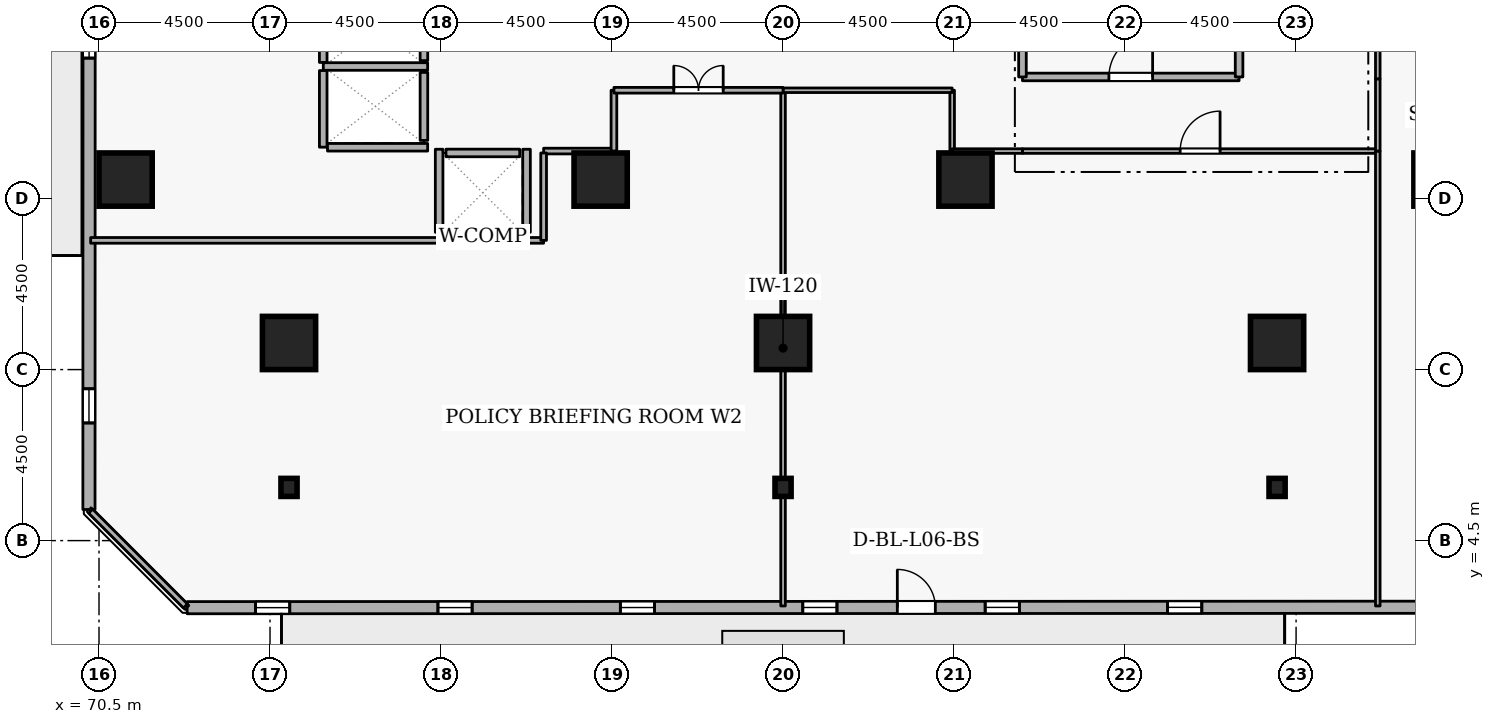
"""IFC4 building model, lengths in metres.
Left out: names, types, materials, properties, quantities, classifications, styles, units other than length and angle.
Written with IfcOpenShell. Run it as: python <this file> out.ifc"""

import sys

from ifc_helpers import new_model, si_unit, direction, frame, frame_2d, origin, origin_2d, place, context, subcontext, project, spatial, rectangle, i_section, extrude, element, fill, save


model = new_model("IFC4")
c1 = context("Model", 3, precision=1e-05, world=origin(), true_north=direction((0.0, 1.0)))
c2 = subcontext(c1, "Body", "Model", "MODEL_VIEW")
j1 = project(units=[si_unit("LENGTHUNIT", "METRE"), si_unit("PLANEANGLEUNIT", "RADIAN")], contexts=[c1])
p1 = place(None, origin())
s1 = spatial("IfcSite", under=j1, at=p1, CompositionType="ELEMENT")
p2 = place(p1, origin())
s2 = spatial("IfcBuilding", under=s1, at=p2, CompositionType="ELEMENT")
p3 = place(p2, frame((0.0, 0.0, 27.9)))
s3 = spatial("IfcBuildingStorey", under=s2, at=p3, CompositionType="ELEMENT", Elevation=27.9)
for number, where, z_axis, x_axis in (
    (1, (105.8, 14.0, 0.0), (0.0, 0.0, 1.0), (1.0, 0.0, 0.0)),
    (2, (71.2, 14.0, 0.0), (0.0, 0.0, 1.0), (1.0, 0.0, 0.0)),
    (3, (101.5, 9.7, 0.0), (0.0, 0.0, 1.0), (1.0, 0.0, 0.0)),
    (4, (88.5, 9.7, 0.0), (0.0, 0.0, 1.0), (1.0, 0.0, 0.0)),
    (5, (75.5, 9.7, 0.0), (0.0, 0.0, 1.0), (1.0, 0.0, 0.0)),
    (6, (93.3, 14.0, 0.0), (0.0, 0.0, 1.0), (1.0, 0.0, 0.0)),
    (7, (83.7, 14.0, 0.0), (0.0, 0.0, 1.0), (1.0, 0.0, 0.0)),
):
    element("IfcColumn", number, at=place(p3, frame(where, z_axis=z_axis, x_axis=x_axis)), inside=s3, PredefinedType="COLUMN", context=c2, shape_type="SweptSolid", body=[
        extrude(rectangle(XDim=1.4, YDim=1.4, at=origin_2d()), origin(), (0.0, 0.0, 1.0), 3.6),
    ])
for number, where, z_axis, x_axis in (
    (8, (101.5, 5.9, 0.0), (0.0, 0.0, 1.0), (1.0, 0.0, 0.0)),
    (9, (88.5, 5.9, 0.0), (0.0, 0.0, 1.0), (1.0, 0.0, 0.0)),
    (10, (75.5, 5.9, 0.0), (0.0, 0.0, 1.0), (1.0, 0.0, 0.0)),
):
    element("IfcColumn", number, at=place(p3, frame(where, z_axis=z_axis, x_axis=x_axis)), inside=s3, PredefinedType="COLUMN", context=c2, shape_type="SweptSolid", body=[
        extrude(i_section(OverallWidth=0.424, OverallDepth=0.475, WebThickness=0.048, FlangeThickness=0.077, FilletRadius=0.015, at=origin_2d()), origin(), (0.0, 0.0, 1.0), 3.6),
    ])
p4 = place(p3, frame((72.819, 2.735, 0.0), z_axis=(0.0, 0.0, 1.0), x_axis=(0.999999942296, 0.000339718087, 0.0)))
e11 = element("IfcWall", 11, at=p4, inside=s3, PredefinedType="STANDARD", context=c2, shape_type="SweptSolid", body=[
    extrude(rectangle(XDim=33.777, YDim=0.32, at=frame_2d((16.888, 0.0))), origin(), (0.0, 0.0, 1.0), 2.7),
])
p5 = place(p4, frame((18.688, 0.0, 0.0)))
e12 = element("IfcOpeningElement", 12, at=p5, cuts=e11, PredefinedType="OPENING", context=c2, shape_type="SweptSolid", body=[
    extrude(rectangle(XDim=1.0, YDim=2.08, at=frame_2d((0.5, 1.04))), frame((0.0, 0.17, 0.0), z_axis=(0.0, -1.0, 0.0), x_axis=(1.0, 0.0, 0.0)), (0.0, 0.0, 1.0), 0.34),
])
p6 = place(p4, frame((1.8, 0.0, 0.72)))
e13 = element("IfcOpeningElement", 13, at=p6, cuts=e11, PredefinedType="OPENING", context=c2, shape_type="SweptSolid", body=[
    extrude(rectangle(XDim=0.9, YDim=1.75, at=frame_2d((0.45, 0.875))), frame((0.0, 0.17, 0.0), z_axis=(0.0, -1.0, 0.0), x_axis=(1.0, 0.0, 0.0)), (0.0, 0.0, 1.0), 0.34),
])
p7 = place(p4, frame((6.6, 0.0, 0.72)))
e14 = element("IfcOpeningElement", 14, at=p7, cuts=e11, PredefinedType="OPENING", context=c2, shape_type="SweptSolid", body=[
    extrude(rectangle(XDim=0.9, YDim=1.75, at=frame_2d((0.45, 0.875))), frame((0.0, 0.17, 0.0), z_axis=(0.0, -1.0, 0.0), x_axis=(1.0, 0.0, 0.0)), (0.0, 0.0, 1.0), 0.34),
])
p8 = place(p4, frame((11.4, 0.0, 0.72)))
e15 = element("IfcOpeningElement", 15, at=p8, cuts=e11, PredefinedType="OPENING", context=c2, shape_type="SweptSolid", body=[
    extrude(rectangle(XDim=0.9, YDim=1.75, at=frame_2d((0.45, 0.875))), frame((0.0, 0.17, 0.0), z_axis=(0.0, -1.0, 0.0), x_axis=(1.0, 0.0, 0.0)), (0.0, 0.0, 1.0), 0.34),
])
p9 = place(p4, frame((16.2, 0.0, 0.72)))
e16 = element("IfcOpeningElement", 16, at=p9, cuts=e11, PredefinedType="OPENING", context=c2, shape_type="SweptSolid", body=[
    extrude(rectangle(XDim=0.9, YDim=1.75, at=frame_2d((0.45, 0.875))), frame((0.0, 0.17, 0.0), z_axis=(0.0, -1.0, 0.0), x_axis=(1.0, 0.0, 0.0)), (0.0, 0.0, 1.0), 0.34),
])
p10 = place(p4, frame((21.0, 0.0, 0.72)))
e17 = element("IfcOpeningElement", 17, at=p10, cuts=e11, PredefinedType="OPENING", context=c2, shape_type="SweptSolid", body=[
    extrude(rectangle(XDim=0.9, YDim=1.75, at=frame_2d((0.45, 0.875))), frame((0.0, 0.17, 0.0), z_axis=(0.0, -1.0, 0.0), x_axis=(1.0, 0.0, 0.0)), (0.0, 0.0, 1.0), 0.34),
])
p11 = place(p4, frame((25.8, 0.0, 0.72)))
e18 = element("IfcOpeningElement", 18, at=p11, cuts=e11, PredefinedType="OPENING", context=c2, shape_type="SweptSolid", body=[
    extrude(rectangle(XDim=0.9, YDim=1.75, at=frame_2d((0.45, 0.875))), frame((0.0, 0.17, 0.0), z_axis=(0.0, -1.0, 0.0), x_axis=(1.0, 0.0, 0.0)), (0.0, 0.0, 1.0), 0.34),
])
p12 = place(p3, frame((70.247, 39.096, 0.0), z_axis=(0.0, 0.0, 1.0), x_axis=(-0.000339718087, -0.999999942296, 0.0)))
e19 = element("IfcWall", 19, at=p12, inside=s3, PredefinedType="STANDARD", context=c2, shape_type="SweptSolid", body=[
    extrude(rectangle(XDim=33.777, YDim=0.32, at=frame_2d((16.888, 0.0))), origin(), (0.0, 0.0, 1.0), 2.7),
])
p13 = place(p12, frame((6.6, 0.0, 0.72)))
e20 = element("IfcOpeningElement", 20, at=p13, cuts=e19, PredefinedType="OPENING", context=c2, shape_type="SweptSolid", body=[
    extrude(rectangle(XDim=0.9, YDim=1.75, at=frame_2d((0.45, 0.875))), frame((0.0, 0.17, 0.0), z_axis=(0.0, -1.0, 0.0), x_axis=(1.0, 0.0, 0.0)), (0.0, 0.0, 1.0), 0.34),
])
p14 = place(p12, frame((16.2, 0.0, 0.72)))
e21 = element("IfcOpeningElement", 21, at=p14, cuts=e19, PredefinedType="OPENING", context=c2, shape_type="SweptSolid", body=[
    extrude(rectangle(XDim=0.9, YDim=1.75, at=frame_2d((0.45, 0.875))), frame((0.0, 0.17, 0.0), z_axis=(0.0, -1.0, 0.0), x_axis=(1.0, 0.0, 0.0)), (0.0, 0.0, 1.0), 0.34),
])
p15 = place(p12, frame((21.0, 0.0, 0.72)))
e22 = element("IfcOpeningElement", 22, at=p15, cuts=e19, PredefinedType="OPENING", context=c2, shape_type="SweptSolid", body=[
    extrude(rectangle(XDim=0.9, YDim=1.75, at=frame_2d((0.45, 0.875))), frame((0.0, 0.17, 0.0), z_axis=(0.0, -1.0, 0.0), x_axis=(1.0, 0.0, 0.0)), (0.0, 0.0, 1.0), 0.34),
])
p16 = place(p12, frame((30.6, 0.0, 0.72)))
e23 = element("IfcOpeningElement", 23, at=p16, cuts=e19, PredefinedType="OPENING", context=c2, shape_type="SweptSolid", body=[
    extrude(rectangle(XDim=0.9, YDim=1.75, at=frame_2d((0.45, 0.875))), frame((0.0, 0.17, 0.0), z_axis=(0.0, -1.0, 0.0), x_axis=(1.0, 0.0, 0.0)), (0.0, 0.0, 1.0), 0.34),
])
p17 = place(p3, frame((79.05, 17.13, 0.0), z_axis=(0.0, 0.0, 1.0), x_axis=(0.0, 1.0, 0.0)))
e24 = element("IfcWall", 24, at=p17, inside=s3, PredefinedType="STANDARD", context=c2, shape_type="SweptSolid", body=[
    extrude(rectangle(XDim=1.74, YDim=0.2, at=frame_2d((0.87, 0.0))), origin(), (0.0, 0.0, 1.0), 3.34),
])
p18 = place(p3, frame((79.05, 15.03, 0.0), z_axis=(0.0, 0.0, 1.0), x_axis=(0.0, 1.0, 0.0)))
e25 = element("IfcWall", 25, at=p18, inside=s3, PredefinedType="STANDARD", context=c2, shape_type="SweptSolid", body=[
    extrude(rectangle(XDim=1.79, YDim=0.2, at=frame_2d((0.895, 0.0))), origin(), (0.0, 0.0, 1.0), 3.34),
])
p19 = place(p3, frame((79.63, 14.7, 0.0), z_axis=(0.0, 0.0, 1.0), x_axis=(1.0, 0.0, 0.0)))
e26 = element("IfcWall", 26, at=p19, inside=s3, PredefinedType="STANDARD", context=c2, shape_type="SweptSolid", body=[
    extrude(rectangle(XDim=1.94, YDim=0.2, at=frame_2d((0.97, 0.0))), origin(), (0.0, 0.0, 1.0), 3.34),
])
p20 = place(p3, frame((76.402, 16.975, 0.0), z_axis=(0.0, 0.0, 1.0), x_axis=(1.0, 0.0, 0.0)))
e27 = element("IfcWall", 27, at=p20, inside=s3, PredefinedType="STANDARD", context=c2, shape_type="SweptSolid", body=[
    extrude(rectangle(XDim=2.746, YDim=0.2, at=frame_2d((1.373, 0.0))), origin(), (0.0, 0.0, 1.0), 3.34),
])
p21 = place(p3, frame((76.4, 14.852, 0.0), z_axis=(0.0, 0.0, 1.0), x_axis=(0.0, 1.0, 0.0)))
e28 = element("IfcWall", 28, at=p21, inside=s3, PredefinedType="STANDARD", context=c2, shape_type="SweptSolid", body=[
    extrude(rectangle(XDim=2.016, YDim=0.2, at=frame_2d((1.008, 0.0))), origin(), (0.0, 0.0, 1.0), 3.34),
])
p22 = place(p3, frame((76.4, 17.082, 0.0), z_axis=(0.0, 0.0, 1.0), x_axis=(0.0, 1.0, 0.0)))
e29 = element("IfcWall", 29, at=p22, inside=s3, PredefinedType="STANDARD", context=c2, shape_type="SweptSolid", body=[
    extrude(rectangle(XDim=1.856, YDim=0.2, at=frame_2d((0.928, 0.0))), origin(), (0.0, 0.0, 1.0), 3.34),
])
p23 = place(p3, frame((76.512, 14.85, 0.0), z_axis=(0.0, 0.0, 1.0), x_axis=(1.0, 0.0, 0.0)))
e30 = element("IfcWall", 30, at=p23, inside=s3, PredefinedType="STANDARD", context=c2, shape_type="SweptSolid", body=[
    extrude(rectangle(XDim=2.636, YDim=0.2, at=frame_2d((1.318, 0.0))), origin(), (0.0, 0.0, 1.0), 3.34),
])
p24 = place(p3, frame((79.452, 12.5, 0.0), z_axis=(0.0, 0.0, 1.0), x_axis=(1.0, 0.0, 0.0)))
e31 = element("IfcWall", 31, at=p24, inside=s3, PredefinedType="STANDARD", context=c2, shape_type="SweptSolid", body=[
    extrude(rectangle(XDim=2.296, YDim=0.2, at=frame_2d((1.148, 0.0))), origin(), (0.0, 0.0, 1.0), 3.34),
])
for number, where, z_axis, x_axis in (
    (32, (81.75, 12.612, 0.0), (0.0, 0.0, 1.0), (0.0, 1.0, 0.0)),
    (33, (79.45, 12.612, 0.0), (0.0, 0.0, 1.0), (0.0, 1.0, 0.0)),
):
    element("IfcWall", number, at=place(p3, frame(where, z_axis=z_axis, x_axis=x_axis)), inside=s3, PredefinedType="STANDARD", context=c2, shape_type="SweptSolid", body=[
        extrude(rectangle(XDim=2.186, YDim=0.2, at=frame_2d((1.093, 0.0))), origin(), (0.0, 0.0, 1.0), 3.34),
    ])
p25 = place(p3, frame((94.8, 16.7, 0.0), z_axis=(0.0, 0.0, 1.0), x_axis=(1.0, 0.0, 0.0)))
e34 = element("IfcWall", 34, at=p25, inside=s3, PredefinedType="STANDARD", context=c2, shape_type="SweptSolid", body=[
    extrude(rectangle(XDim=5.7, YDim=0.2, at=frame_2d((2.85, 0.0))), origin(), (0.0, 0.0, 1.0), 3.34),
])
p26 = place(p25, frame((2.275, 0.0, 0.0)))
e35 = element("IfcOpeningElement", 35, at=p26, cuts=e34, PredefinedType="OPENING", context=c2, shape_type="SweptSolid", body=[
    extrude(rectangle(XDim=1.15, YDim=2.1, at=frame_2d((0.575, 1.05))), frame((0.0, 0.11, 0.0), z_axis=(0.0, -1.0, 0.0), x_axis=(1.0, 0.0, 0.0)), (0.0, 0.0, 1.0), 0.22),
])
for number, where, z_axis, x_axis in (
    (36, (100.5, 16.7, 0.0), (0.0, 0.0, 1.0), (0.0, 1.0, 0.0)),
    (37, (94.8, 19.2, 0.0), (0.0, 0.0, 1.0), (0.0, -1.0, 0.0)),
):
    element("IfcWall", number, at=place(p3, frame(where, z_axis=z_axis, x_axis=x_axis)), inside=s3, PredefinedType="STANDARD", context=c2, shape_type="SweptSolid", body=[
        extrude(rectangle(XDim=2.5, YDim=0.2, at=frame_2d((1.25, 0.0))), origin(), (0.0, 0.0, 1.0), 3.34),
    ])
p27 = place(p3, frame((92.95, 16.35, 0.0), z_axis=(0.0, 0.0, 1.0), x_axis=(0.0, -1.0, 0.0)))
e38 = element("IfcWall", 38, at=p27, inside=s3, PredefinedType="PARTITIONING", context=c2, shape_type="SweptSolid", body=[
    extrude(rectangle(XDim=1.6, YDim=0.12, at=frame_2d((0.8, 0.0))), origin(), (0.0, 0.0, 1.0), 3.34),
])
p28 = place(p3, frame((92.95, 14.75, 0.0), z_axis=(0.0, 0.0, 1.0), x_axis=(1.0, 0.0, 0.0)))
e39 = element("IfcWall", 39, at=p28, inside=s3, PredefinedType="PARTITIONING", context=c2, shape_type="SweptSolid", body=[
    extrude(rectangle(XDim=1.85, YDim=0.12, at=frame_2d((0.925, 0.0))), origin(), (0.0, 0.0, 1.0), 3.34),
])
p29 = place(p3, frame((94.8, 14.75, 0.0), z_axis=(0.0, 0.0, 1.0), x_axis=(1.0, 0.0, 0.0)))
e40 = element("IfcWall", 40, at=p29, inside=s3, PredefinedType="PARTITIONING", context=c2, shape_type="SweptSolid", body=[
    extrude(rectangle(XDim=9.35, YDim=0.12, at=frame_2d((4.675, 0.0))), origin(), (0.0, 0.0, 1.0), 3.34),
])
p30 = place(p29, frame((4.15, 0.0, 0.0)))
e41 = element("IfcOpeningElement", 41, at=p30, cuts=e40, PredefinedType="OPENING", context=c2, shape_type="SweptSolid", body=[
    extrude(rectangle(XDim=1.05, YDim=2.1, at=frame_2d((0.525, 1.05))), frame((0.0, 0.07, 0.0), z_axis=(0.0, -1.0, 0.0), x_axis=(1.0, 0.0, 0.0)), (0.0, 0.0, 1.0), 0.14),
])
p31 = place(p3, frame((104.15, 14.75, 0.0), z_axis=(0.0, 0.0, 1.0), x_axis=(0.0, -1.0, 0.0)))
e42 = element("IfcWall", 42, at=p31, inside=s3, PredefinedType="PARTITIONING", context=c2, shape_type="SweptSolid", body=[
    extrude(rectangle(XDim=11.97, YDim=0.12, at=frame_2d((5.985, 0.0))), origin(), (0.0, 0.0, 1.0), 3.34),
])
p32 = place(p3, frame((88.5, 2.78, 0.0), z_axis=(0.0, 0.0, 1.0), x_axis=(0.0, 1.0, 0.0)))
e43 = element("IfcWall", 43, at=p32, inside=s3, PredefinedType="PARTITIONING", context=c2, shape_type="SweptSolid", body=[
    extrude(rectangle(XDim=13.57, YDim=0.12, at=frame_2d((6.785, 0.0))), origin(), (0.0, 0.0, 1.0), 2.878),
])
p33 = place(p3, frame((88.5, 16.35, 0.0), z_axis=(0.0, 0.0, 1.0), x_axis=(1.0, 0.0, 0.0)))
e44 = element("IfcWall", 44, at=p33, inside=s3, PredefinedType="PARTITIONING", context=c2, shape_type="SweptSolid", body=[
    extrude(rectangle(XDim=4.45, YDim=0.12, at=frame_2d((2.225, 0.0))), origin(), (0.0, 0.0, 1.0), 3.34),
])
p34 = place(p3, frame((82.2, 14.75, 0.0), z_axis=(0.0, 0.0, 1.0), x_axis=(1.0, 0.0, 0.0)))
e45 = element("IfcWall", 45, at=p34, inside=s3, PredefinedType="PARTITIONING", context=c2, shape_type="SweptSolid", body=[
    extrude(rectangle(XDim=1.85, YDim=0.15, at=frame_2d((0.925, 0.0))), origin(), (0.0, 0.0, 1.0), 3.34),
])
p35 = place(p3, frame((84.05, 14.75, 0.0), z_axis=(0.0, 0.0, 1.0), x_axis=(0.0, 1.0, 0.0)))
e46 = element("IfcWall", 46, at=p35, inside=s3, PredefinedType="PARTITIONING", context=c2, shape_type="SweptSolid", body=[
    extrude(rectangle(XDim=1.6, YDim=0.15, at=frame_2d((0.8, 0.0))), origin(), (0.0, 0.0, 1.0), 3.34),
])
p36 = place(p3, frame((84.05, 16.35, 0.0), z_axis=(0.0, 0.0, 1.0), x_axis=(1.0, 0.0, 0.0)))
e47 = element("IfcWall", 47, at=p36, inside=s3, PredefinedType="PARTITIONING", context=c2, shape_type="SweptSolid", body=[
    extrude(rectangle(XDim=4.45, YDim=0.15, at=frame_2d((2.225, 0.0))), origin(), (0.0, 0.0, 1.0), 3.34),
])
p37 = place(p36, frame((1.575, 0.0, 0.0)))
e48 = element("IfcOpeningElement", 48, at=p37, cuts=e47, PredefinedType="OPENING", context=c2, shape_type="SweptSolid", body=[
    extrude(rectangle(XDim=1.3, YDim=2.12, at=frame_2d((0.65, 1.06))), frame((0.0, 0.085, 0.0), z_axis=(0.0, -1.0, 0.0), x_axis=(1.0, 0.0, 0.0)), (0.0, 0.0, 1.0), 0.17),
])
p38 = place(p3, frame((72.775, 2.78, 0.0), z_axis=(0.0, 0.0, 1.0), x_axis=(-0.707106781187, 0.707106781187, 0.0)))
e49 = element("IfcWall", 49, at=p38, inside=s3, PredefinedType="PARTITIONING", context=c2, shape_type="SweptSolid", body=[
    extrude(rectangle(XDim=3.528, YDim=0.15, at=frame_2d((1.764, 0.0))), origin(), (0.0, 0.0, 1.0), 3.34),
])
p39 = place(p3, frame((70.28, 12.4, 0.0), z_axis=(0.0, 0.0, 1.0), x_axis=(1.0, 0.0, 0.0)))
e50 = element("IfcWall", 50, at=p39, inside=s3, PredefinedType="PARTITIONING", context=c2, shape_type="SweptSolid", body=[
    extrude(rectangle(XDim=9.172, YDim=0.15, at=frame_2d((4.586, 0.0))), origin(), (0.0, 0.0, 1.0), 3.34),
])
p40 = place(p3, frame((81.748, 12.4, 0.0), z_axis=(0.0, 0.0, 1.0), x_axis=(1.0, 0.0, 0.0)))
e51 = element("IfcWall", 51, at=p40, inside=s3, PredefinedType="PARTITIONING", context=c2, shape_type="SweptSolid", body=[
    extrude(rectangle(XDim=0.452, YDim=0.15, at=frame_2d((0.226, 0.0))), origin(), (0.0, 0.0, 1.0), 3.34),
])
p41 = place(p3, frame((82.2, 12.4, 0.0), z_axis=(0.0, 0.0, 1.0), x_axis=(0.0, 1.0, 0.0)))
e52 = element("IfcWall", 52, at=p41, inside=s3, PredefinedType="PARTITIONING", context=c2, shape_type="SweptSolid", body=[
    extrude(rectangle(XDim=2.3, YDim=0.15, at=frame_2d((1.15, 0.0))), origin(), (0.0, 0.0, 1.0), 3.34),
])
p42 = place(p3, frame((104.15, 14.75, 0.0), z_axis=(0.0, 0.0, 1.0), x_axis=(0.0, 1.0, 0.0)))
e53 = element("IfcWall", 53, at=p42, inside=s3, PredefinedType="PARTITIONING", context=c2, shape_type="SweptSolid", body=[
    extrude(rectangle(XDim=1.9, YDim=0.12, at=frame_2d((0.95, 0.0))), origin(), (0.0, 0.0, 1.0), 3.34),
])
p43 = place(p3, frame((104.15, 16.65, 0.0), z_axis=(0.0, 0.0, 1.0), x_axis=(0.0, 1.0, 0.0)))
e54 = element("IfcWall", 54, at=p43, inside=s3, PredefinedType="PARTITIONING", context=c2, shape_type="SweptSolid", body=[
    extrude(rectangle(XDim=10.35, YDim=0.12, at=frame_2d((5.175, 0.0))), origin(), (0.0, 0.0, 1.0), 3.34),
])
p44 = place(p43, frame((4.65, 0.0, 0.0)))
e55 = element("IfcOpeningElement", 55, at=p44, cuts=e54, PredefinedType="OPENING", context=c2, shape_type="SweptSolid", body=[
    extrude(rectangle(XDim=1.05, YDim=2.1, at=frame_2d((0.525, 1.05))), frame((0.0, 0.07, 0.0), z_axis=(0.0, -1.0, 0.0), x_axis=(1.0, 0.0, 0.0)), (0.0, 0.0, 1.0), 0.14),
])
p45 = place(p5, origin())
e56 = element("IfcDoor", 56, at=p45, inside=s3, OperationType="SINGLE_SWING_LEFT", PredefinedType="DOOR", context=c2, shape_type="SweptSolid", body=[
    extrude(rectangle(XDim=1.0, YDim=2.08, at=frame_2d((0.5, 1.04))), frame((0.0, 0.025, 0.0), z_axis=(0.0, -1.0, 0.0), x_axis=(1.0, 0.0, 0.0)), (0.0, 0.0, 1.0), 0.05),
])
fill(e12, e56)
p46 = place(p6, origin())
e57 = element("IfcWindow", 57, at=p46, inside=s3, PartitioningType="SINGLE_PANEL", PredefinedType="WINDOW", context=c2, shape_type="SweptSolid", body=[
    extrude(rectangle(XDim=0.9, YDim=1.75, at=frame_2d((0.45, 0.875))), frame((0.0, 0.03, 0.0), z_axis=(0.0, -1.0, 0.0), x_axis=(1.0, 0.0, 0.0)), (0.0, 0.0, 1.0), 0.06),
])
fill(e13, e57)
p47 = place(p7, origin())
e58 = element("IfcWindow", 58, at=p47, inside=s3, PartitioningType="SINGLE_PANEL", PredefinedType="WINDOW", context=c2, shape_type="SweptSolid", body=[
    extrude(rectangle(XDim=0.9, YDim=1.75, at=frame_2d((0.45, 0.875))), frame((0.0, 0.03, 0.0), z_axis=(0.0, -1.0, 0.0), x_axis=(1.0, 0.0, 0.0)), (0.0, 0.0, 1.0), 0.06),
])
fill(e14, e58)
p48 = place(p8, origin())
e59 = element("IfcWindow", 59, at=p48, inside=s3, PartitioningType="SINGLE_PANEL", PredefinedType="WINDOW", context=c2, shape_type="SweptSolid", body=[
    extrude(rectangle(XDim=0.9, YDim=1.75, at=frame_2d((0.45, 0.875))), frame((0.0, 0.03, 0.0), z_axis=(0.0, -1.0, 0.0), x_axis=(1.0, 0.0, 0.0)), (0.0, 0.0, 1.0), 0.06),
])
fill(e15, e59)
p49 = place(p9, origin())
e60 = element("IfcWindow", 60, at=p49, inside=s3, PartitioningType="SINGLE_PANEL", PredefinedType="WINDOW", context=c2, shape_type="SweptSolid", body=[
    extrude(rectangle(XDim=0.9, YDim=1.75, at=frame_2d((0.45, 0.875))), frame((0.0, 0.03, 0.0), z_axis=(0.0, -1.0, 0.0), x_axis=(1.0, 0.0, 0.0)), (0.0, 0.0, 1.0), 0.06),
])
fill(e16, e60)
p50 = place(p10, origin())
e61 = element("IfcWindow", 61, at=p50, inside=s3, PartitioningType="SINGLE_PANEL", PredefinedType="WINDOW", context=c2, shape_type="SweptSolid", body=[
    extrude(rectangle(XDim=0.9, YDim=1.75, at=frame_2d((0.45, 0.875))), frame((0.0, 0.03, 0.0), z_axis=(0.0, -1.0, 0.0), x_axis=(1.0, 0.0, 0.0)), (0.0, 0.0, 1.0), 0.06),
])
fill(e17, e61)
p51 = place(p11, origin())
e62 = element("IfcWindow", 62, at=p51, inside=s3, PartitioningType="SINGLE_PANEL", PredefinedType="WINDOW", context=c2, shape_type="SweptSolid", body=[
    extrude(rectangle(XDim=0.9, YDim=1.75, at=frame_2d((0.45, 0.875))), frame((0.0, 0.03, 0.0), z_axis=(0.0, -1.0, 0.0), x_axis=(1.0, 0.0, 0.0)), (0.0, 0.0, 1.0), 0.06),
])
fill(e18, e62)
p52 = place(p15, origin())
e63 = element("IfcWindow", 63, at=p52, inside=s3, PartitioningType="SINGLE_PANEL", PredefinedType="WINDOW", context=c2, shape_type="SweptSolid", body=[
    extrude(rectangle(XDim=0.9, YDim=1.75, at=frame_2d((0.45, 0.875))), frame((0.0, 0.03, 0.0), z_axis=(0.0, -1.0, 0.0), x_axis=(1.0, 0.0, 0.0)), (0.0, 0.0, 1.0), 0.06),
])
fill(e22, e63)
p53 = place(p16, origin())
e64 = element("IfcWindow", 64, at=p53, inside=s3, PartitioningType="SINGLE_PANEL", PredefinedType="WINDOW", context=c2, shape_type="SweptSolid", body=[
    extrude(rectangle(XDim=0.9, YDim=1.75, at=frame_2d((0.45, 0.875))), frame((0.0, 0.03, 0.0), z_axis=(0.0, -1.0, 0.0), x_axis=(1.0, 0.0, 0.0)), (0.0, 0.0, 1.0), 0.06),
])
fill(e23, e64)
p54 = place(p26, origin())
e65 = element("IfcDoor", 65, at=p54, inside=s3, OperationType="SINGLE_SWING_RIGHT", PredefinedType="DOOR", context=c2, shape_type="SweptSolid", body=[
    extrude(rectangle(XDim=1.15, YDim=2.1, at=frame_2d((0.575, 1.05))), frame((0.0, 0.025, 0.0), z_axis=(0.0, -1.0, 0.0), x_axis=(1.0, 0.0, 0.0)), (0.0, 0.0, 1.0), 0.05),
])
fill(e35, e65)
p55 = place(p30, origin())
e66 = element("IfcDoor", 66, at=p55, inside=s3, OperationType="SINGLE_SWING_RIGHT", PredefinedType="DOOR", context=c2, shape_type="SweptSolid", body=[
    extrude(rectangle(XDim=1.05, YDim=2.1, at=frame_2d((0.525, 1.05))), frame((0.0, 0.025, 0.0), z_axis=(0.0, -1.0, 0.0), x_axis=(1.0, 0.0, 0.0)), (0.0, 0.0, 1.0), 0.05),
])
fill(e41, e66)
p56 = place(p37, origin())
e67 = element("IfcDoor", 67, at=p56, inside=s3, OperationType="DOUBLE_DOOR_SINGLE_SWING", PredefinedType="DOOR", context=c2, shape_type="SweptSolid", body=[
    extrude(rectangle(XDim=1.3, YDim=2.12, at=frame_2d((0.65, 1.06))), frame((0.0, 0.025, 0.0), z_axis=(0.0, -1.0, 0.0), x_axis=(1.0, 0.0, 0.0)), (0.0, 0.0, 1.0), 0.05),
])
fill(e48, e67)
save(model, sys.argv[1])
